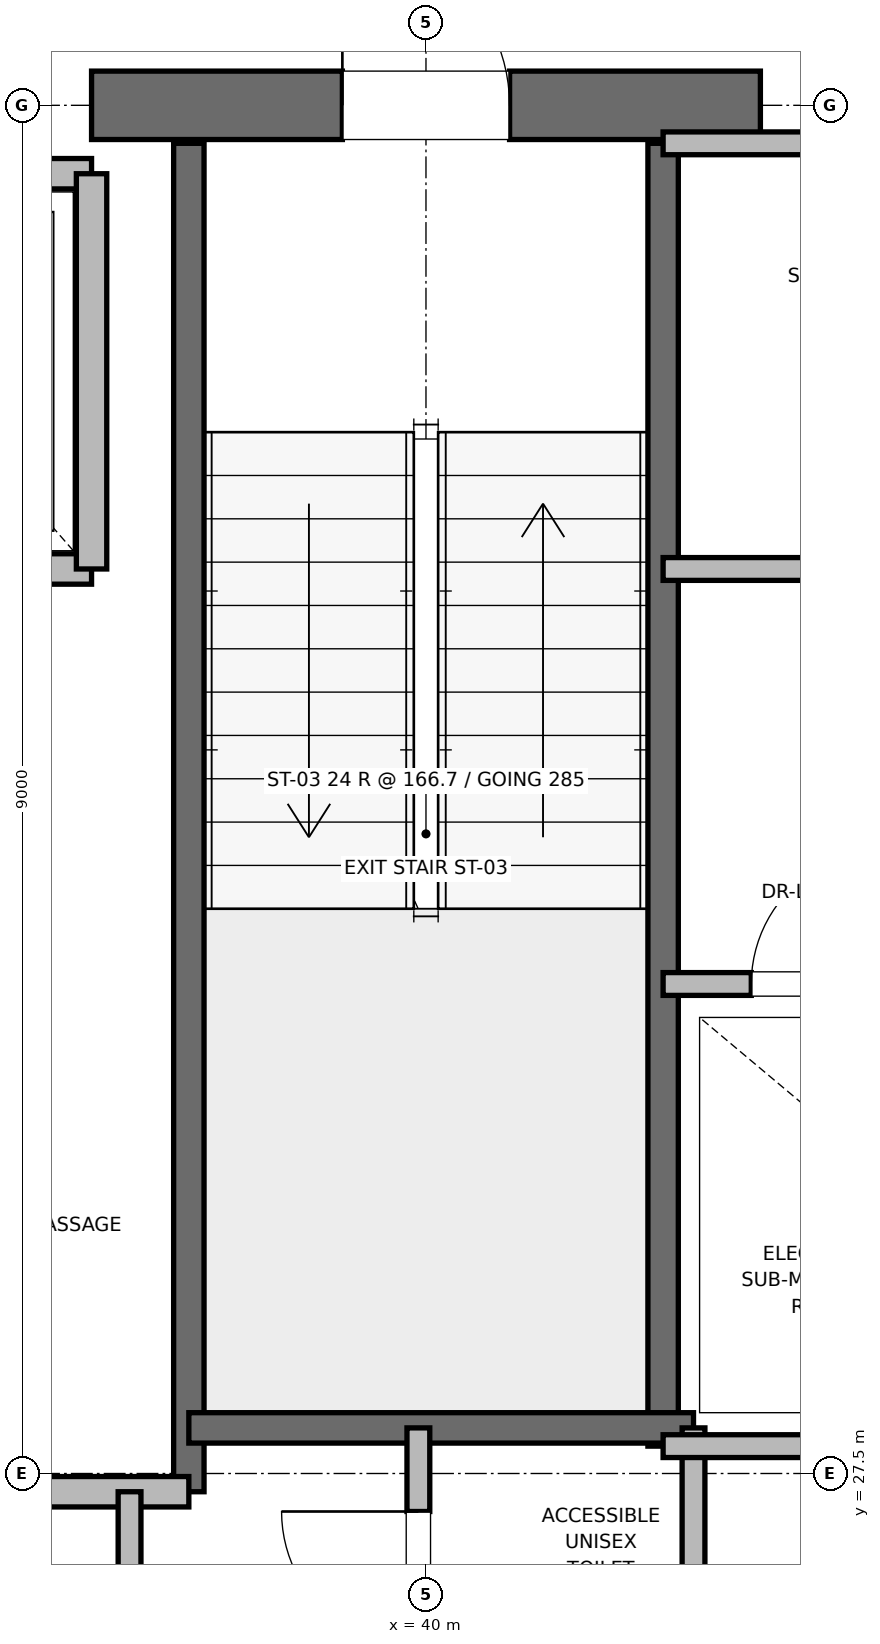
"""IFC4 building model, lengths in metres.
Left out: names, types, materials, properties, quantities, classifications, styles, units other than length and angle.
Written with IfcOpenShell. Run it as: python <this file> out.ifc"""

import sys

from ifc_helpers import new_model, si_unit, direction, frame, frame_2d, origin, place, context, subcontext, project, spatial, rectangle, extrude, element, fill, save


model = new_model("IFC4")
c1 = context("Model", 3, precision=1e-05, world=origin(), true_north=direction((0.0, 1.0)))
c2 = subcontext(c1, "Body", "Model", "MODEL_VIEW")
j1 = project(units=[si_unit("LENGTHUNIT", "METRE"), si_unit("PLANEANGLEUNIT", "RADIAN")], contexts=[c1])
p1 = place(None, origin())
s1 = spatial("IfcSite", under=j1, at=p1, CompositionType="ELEMENT")
p2 = place(p1, origin())
s2 = spatial("IfcBuilding", under=s1, at=p2, CompositionType="ELEMENT")
p3 = place(p2, frame((0.0, 0.0, 247.2)))
s3 = spatial("IfcBuildingStorey", under=s2, at=p3, CompositionType="ELEMENT", Elevation=247.2)
p4 = place(p3, frame((37.8, 36.5, 0.0), z_axis=(0.0, 0.0, 1.0), x_axis=(1.0, 0.0, 0.0)))
e1 = element("IfcWall", 1, at=p4, inside=s3, PredefinedType="SHEAR", context=c2, shape_type="SweptSolid", body=[
    extrude(rectangle(XDim=4.4, YDim=0.45, at=frame_2d((2.2, 0.0))), origin(), (0.0, 0.0, 1.0), 3.785),
])
p5 = place(p4, frame((1.65, 0.0, 0.0)))
e2 = element("IfcOpeningElement", 2, at=p5, cuts=e1, PredefinedType="OPENING", context=c2, shape_type="SweptSolid", body=[
    extrude(rectangle(XDim=1.1, YDim=2.15, at=frame_2d((0.55, 1.075))), frame((0.0, 0.225, 0.0), z_axis=(0.0, -1.0, 0.0), x_axis=(1.0, 0.0, 0.0)), (0.0, 0.0, 1.0), 0.45),
])
p6 = place(p3, frame((38.44, 27.38, 0.0), z_axis=(0.0, 0.0, 1.0), x_axis=(0.0, 1.0, 0.0)))
e3 = element("IfcWall", 3, at=p6, inside=s3, PredefinedType="SOLIDWALL", context=c2, shape_type="SweptSolid", body=[
    extrude(rectangle(XDim=8.87, YDim=0.2, at=frame_2d((4.435, 0.0))), origin(), (0.0, 0.0, 1.0), 3.785),
])
p7 = place(p3, frame((41.56, 27.68, 0.0), z_axis=(0.0, 0.0, 1.0), x_axis=(0.0, 1.0, 0.0)))
e4 = element("IfcWall", 4, at=p7, inside=s3, PredefinedType="SOLIDWALL", context=c2, shape_type="SweptSolid", body=[
    extrude(rectangle(XDim=8.57, YDim=0.2, at=frame_2d((4.285, 0.0))), origin(), (0.0, 0.0, 1.0), 3.785),
])
p8 = place(p3, frame((38.44, 27.8, 0.0), z_axis=(0.0, 0.0, 1.0), x_axis=(1.0, 0.0, 0.0)))
e5 = element("IfcWall", 5, at=p8, inside=s3, PredefinedType="SOLIDWALL", context=c2, shape_type="SweptSolid", body=[
    extrude(rectangle(XDim=3.32, YDim=0.2, at=frame_2d((1.66, 0.0))), origin(), (0.0, 0.0, 1.0), 3.785),
])
p9 = place(p3, frame((32.82, 27.38, 0.0), z_axis=(0.0, 0.0, 1.0), x_axis=(1.0, 0.0, 0.0)))
e6 = element("IfcWall", 6, at=p9, inside=s3, PredefinedType="PARTITIONING", context=c2, shape_type="SweptSolid", body=[
    extrude(rectangle(XDim=5.62, YDim=0.2, at=frame_2d((2.81, 0.0))), origin(), (0.0, 0.0, 1.0), 3.785),
])
p10 = place(p3, frame((35.5, 33.45, 0.0), z_axis=(0.0, 0.0, 1.0), x_axis=(1.0, 0.0, 0.0)))
e7 = element("IfcWall", 7, at=p10, inside=s3, PredefinedType="SOLIDWALL", context=c2, shape_type="SweptSolid", body=[
    extrude(rectangle(XDim=2.3, YDim=0.2, at=frame_2d((1.15, 0.0))), origin(), (0.0, 0.0, 1.0), 3.785),
])
p11 = place(p10, frame((0.6, 0.0, 0.0)))
e8 = element("IfcOpeningElement", 8, at=p11, cuts=e7, PredefinedType="OPENING", context=c2, shape_type="SweptSolid", body=[
    extrude(rectangle(XDim=1.1, YDim=2.2, at=frame_2d((0.55, 1.1))), frame((0.0, 0.1, 0.0), z_axis=(0.0, -1.0, 0.0), x_axis=(1.0, 0.0, 0.0)), (0.0, 0.0, 1.0), 0.2),
])
p12 = place(p3, frame((37.8, 36.05, 0.0), z_axis=(0.0, 0.0, 1.0), x_axis=(-1.0, 0.0, 0.0)))
e9 = element("IfcWall", 9, at=p12, inside=s3, PredefinedType="SOLIDWALL", context=c2, shape_type="SweptSolid", body=[
    extrude(rectangle(XDim=2.3, YDim=0.2, at=frame_2d((1.15, 0.0))), origin(), (0.0, 0.0, 1.0), 2.865),
])
p13 = place(p3, frame((37.8, 33.45, 0.0), z_axis=(0.0, 0.0, 1.0), x_axis=(0.0, 1.0, 0.0)))
e10 = element("IfcWall", 10, at=p13, inside=s3, PredefinedType="SOLIDWALL", context=c2, shape_type="SweptSolid", body=[
    extrude(rectangle(XDim=2.6, YDim=0.2, at=frame_2d((1.3, 0.0))), origin(), (0.0, 0.0, 1.0), 2.865),
])
p14 = place(p3, frame((41.76, 23.8, 0.0), z_axis=(0.0, 0.0, 1.0), x_axis=(0.0, 1.0, 0.0)))
e11 = element("IfcWall", 11, at=p14, inside=s3, PredefinedType="PARTITIONING", context=c2, shape_type="SweptSolid", body=[
    extrude(rectangle(XDim=4.0, YDim=0.15, at=frame_2d((2.0, 0.0))), origin(), (0.0, 0.0, 1.0), 2.85),
])
p15 = place(p3, frame((39.95, 25.8, 0.0), z_axis=(0.0, 0.0, 1.0), x_axis=(0.0, 1.0, 0.0)))
e12 = element("IfcWall", 12, at=p15, inside=s3, PredefinedType="PARTITIONING", context=c2, shape_type="SweptSolid", body=[
    extrude(rectangle(XDim=2.0, YDim=0.15, at=frame_2d((1.0, 0.0))), origin(), (0.0, 0.0, 1.0), 2.85),
])
p16 = place(p15, frame((0.55, 0.0, 0.0)))
e13 = element("IfcOpeningElement", 13, at=p16, cuts=e12, PredefinedType="OPENING", context=c2, shape_type="SweptSolid", body=[
    extrude(rectangle(XDim=0.9, YDim=2.1, at=frame_2d((0.45, 1.05))), frame((0.0, 0.075, 0.0), z_axis=(0.0, -1.0, 0.0), x_axis=(1.0, 0.0, 0.0)), (0.0, 0.0, 1.0), 0.15),
])
p17 = place(p3, frame((38.05, 24.5, 0.0), z_axis=(0.0, 0.0, 1.0), x_axis=(0.0, 1.0, 0.0)))
e14 = element("IfcWall", 14, at=p17, inside=s3, PredefinedType="PARTITIONING", context=c2, shape_type="SweptSolid", body=[
    extrude(rectangle(XDim=2.88, YDim=0.15, at=frame_2d((1.44, 0.0))), origin(), (0.0, 0.0, 1.0), 2.85),
])
p18 = place(p17, frame((0.94, 0.0, 0.0)))
e15 = element("IfcOpeningElement", 15, at=p18, cuts=e14, PredefinedType="OPENING", context=c2, shape_type="SweptSolid", body=[
    extrude(rectangle(XDim=1.0, YDim=2.15, at=frame_2d((0.5, 1.075))), frame((0.0, 0.075, 0.0), z_axis=(0.0, -1.0, 0.0), x_axis=(1.0, 0.0, 0.0)), (0.0, 0.0, 1.0), 0.15),
])
p19 = place(p3, frame((41.56, 27.68, 0.0), z_axis=(0.0, 0.0, 1.0), x_axis=(1.0, 0.0, 0.0)))
e16 = element("IfcWall", 16, at=p19, inside=s3, PredefinedType="PARTITIONING", context=c2, shape_type="SweptSolid", body=[
    extrude(rectangle(XDim=3.59, YDim=0.15, at=frame_2d((1.795, 0.0))), origin(), (0.0, 0.0, 1.0), 2.85),
])
p20 = place(p3, frame((41.56, 30.72, 0.0), z_axis=(0.0, 0.0, 1.0), x_axis=(1.0, 0.0, 0.0)))
e17 = element("IfcWall", 17, at=p20, inside=s3, PredefinedType="PARTITIONING", context=c2, shape_type="SweptSolid", body=[
    extrude(rectangle(XDim=2.04, YDim=0.15, at=frame_2d((1.02, 0.0))), origin(), (0.0, 0.0, 1.0), 2.85),
])
p21 = place(p20, frame((0.58, 0.0, 0.0)))
e18 = element("IfcOpeningElement", 18, at=p21, cuts=e17, PredefinedType="OPENING", context=c2, shape_type="SweptSolid", body=[
    extrude(rectangle(XDim=0.88, YDim=2.1, at=frame_2d((0.44, 1.05))), frame((0.0, 0.075, 0.0), z_axis=(0.0, -1.0, 0.0), x_axis=(1.0, 0.0, 0.0)), (0.0, 0.0, 1.0), 0.15),
])
p22 = place(p3, frame((41.56, 36.25, 0.0), z_axis=(0.0, 0.0, 1.0), x_axis=(1.0, 0.0, 0.0)))
e19 = element("IfcWall", 19, at=p22, inside=s3, PredefinedType="PARTITIONING", context=c2, shape_type="SweptSolid", body=[
    extrude(rectangle(XDim=2.94, YDim=0.15, at=frame_2d((1.47, 0.0))), origin(), (0.0, 0.0, 1.0), 2.85),
])
p23 = place(p3, frame((41.56, 33.45, 0.0), z_axis=(0.0, 0.0, 1.0), x_axis=(1.0, 0.0, 0.0)))
e20 = element("IfcWall", 20, at=p23, inside=s3, PredefinedType="PARTITIONING", context=c2, shape_type="SweptSolid", body=[
    extrude(rectangle(XDim=2.94, YDim=0.15, at=frame_2d((1.47, 0.0))), origin(), (0.0, 0.0, 1.0), 2.85),
])
p24 = place(p23, frame((1.03, 0.0, 0.0)))
e21 = element("IfcOpeningElement", 21, at=p24, cuts=e20, PredefinedType="OPENING", context=c2, shape_type="SweptSolid", body=[
    extrude(rectangle(XDim=0.88, YDim=2.1, at=frame_2d((0.44, 1.05))), frame((0.0, 0.075, 0.0), z_axis=(0.0, -1.0, 0.0), x_axis=(1.0, 0.0, 0.0)), (0.0, 0.0, 1.0), 0.15),
])
p25 = place(p5, origin())
e22 = element("IfcDoor", 22, at=p25, inside=s3, OperationType="SINGLE_SWING_LEFT", PredefinedType="DOOR", context=c2, shape_type="SweptSolid", body=[
    extrude(rectangle(XDim=1.1, YDim=2.15, at=frame_2d((0.55, 1.075))), frame((0.0, 0.025, 0.0), z_axis=(0.0, -1.0, 0.0), x_axis=(1.0, 0.0, 0.0)), (0.0, 0.0, 1.0), 0.05),
])
fill(e2, e22)
p26 = place(p16, origin())
e23 = element("IfcDoor", 23, at=p26, inside=s3, OperationType="SINGLE_SWING_RIGHT", PredefinedType="DOOR", context=c2, shape_type="SweptSolid", body=[
    extrude(rectangle(XDim=0.9, YDim=2.1, at=frame_2d((0.45, 1.05))), frame((0.0, 0.025, 0.0), z_axis=(0.0, -1.0, 0.0), x_axis=(1.0, 0.0, 0.0)), (0.0, 0.0, 1.0), 0.05),
])
fill(e13, e23)
p27 = place(p21, origin())
e24 = element("IfcDoor", 24, at=p27, inside=s3, OperationType="SINGLE_SWING_RIGHT", PredefinedType="DOOR", context=c2, shape_type="SweptSolid", body=[
    extrude(rectangle(XDim=0.88, YDim=2.1, at=frame_2d((0.44, 1.05))), frame((0.0, 0.025, 0.0), z_axis=(0.0, -1.0, 0.0), x_axis=(1.0, 0.0, 0.0)), (0.0, 0.0, 1.0), 0.05),
])
fill(e18, e24)
save(model, sys.argv[1])
